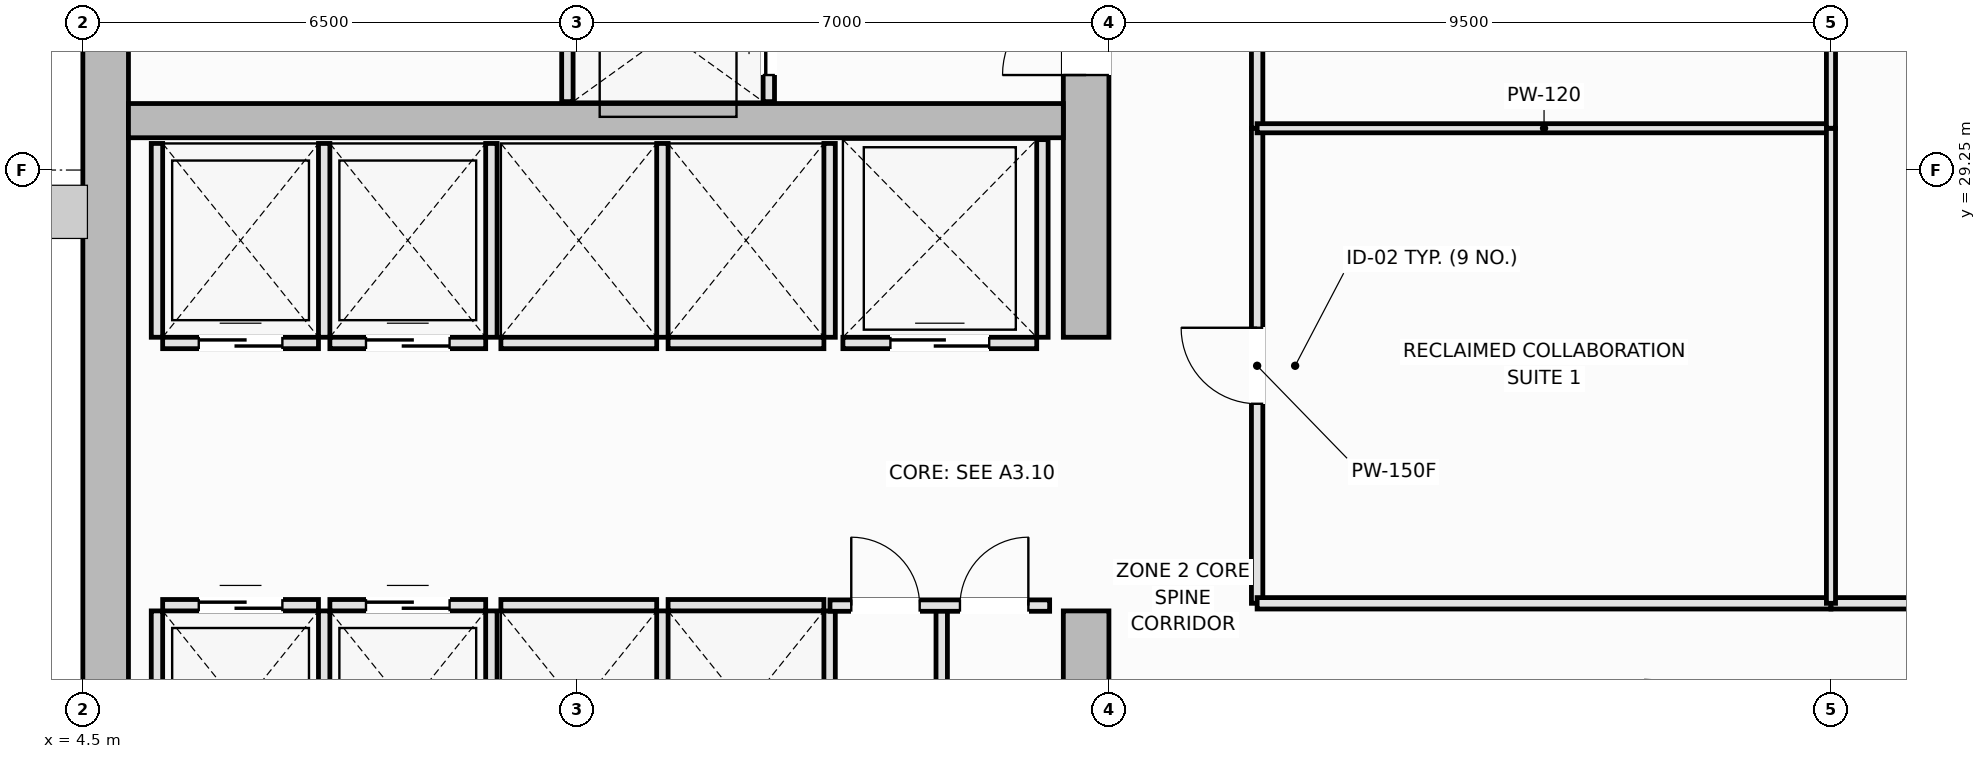
"""IFC4 building model, lengths in metres.
Left out: names, types, materials, properties, quantities, classifications, styles, units other than length and angle.
Written with IfcOpenShell. Run it as: python <this file> out.ifc"""

import sys

from ifc_helpers import new_model, si_unit, direction, frame, frame_2d, origin, place, context, subcontext, project, spatial, rectangle, extrude, element, fill, save


model = new_model("IFC4")
c1 = context("Model", 3, precision=1e-05, world=origin(), true_north=direction((0.0, 1.0)))
c2 = subcontext(c1, "Body", "Model", "MODEL_VIEW")
j1 = project(units=[si_unit("LENGTHUNIT", "METRE"), si_unit("PLANEANGLEUNIT", "RADIAN")], contexts=[c1])
p1 = place(None, origin())
s1 = spatial("IfcSite", under=j1, at=p1, CompositionType="ELEMENT")
p2 = place(p1, origin())
s2 = spatial("IfcBuilding", under=s1, at=p2, CompositionType="ELEMENT")
p3 = place(p2, frame((0.0, 0.0, 134.2)))
s3 = spatial("IfcBuildingStorey", under=s2, at=p3, CompositionType="ELEMENT", Elevation=134.2)
p4 = place(p3, frame((4.8, 14.6, 0.0), z_axis=(0.0, 0.0, 1.0), x_axis=(0.0, 1.0, 0.0)))
e1 = element("IfcWall", 1, at=p4, inside=s3, PredefinedType="SHEAR", context=c2, shape_type="SweptSolid", body=[
    extrude(rectangle(XDim=21.3, YDim=0.6, at=frame_2d((10.65, 0.0))), origin(), (0.0, 0.0, 1.0), 3.55),
])
p5 = place(p3, frame((17.7, 14.6, 0.0), z_axis=(0.0, 0.0, 1.0), x_axis=(0.0, 1.0, 0.0)))
e2 = element("IfcWall", 2, at=p5, inside=s3, PredefinedType="SHEAR", context=c2, shape_type="SweptSolid", body=[
    extrude(rectangle(XDim=8.85, YDim=0.6, at=frame_2d((4.425, 0.0))), origin(), (0.0, 0.0, 1.0), 3.55),
])
p6 = place(p5, frame((4.3, 0.0, 0.0)))
e3 = element("IfcOpeningElement", 3, at=p6, cuts=e2, PredefinedType="OPENING", context=c2, shape_type="SweptSolid", body=[
    extrude(rectangle(XDim=1.1, YDim=2.15, at=frame_2d((0.55, 1.075))), frame((0.0, 0.31, 0.0), z_axis=(0.0, -1.0, 0.0), x_axis=(1.0, 0.0, 0.0)), (0.0, 0.0, 1.0), 0.62),
])
p7 = place(p3, frame((17.7, 27.05, 0.0), z_axis=(0.0, 0.0, 1.0), x_axis=(0.0, 1.0, 0.0)))
e4 = element("IfcWall", 4, at=p7, inside=s3, PredefinedType="SHEAR", context=c2, shape_type="SweptSolid", body=[
    extrude(rectangle(XDim=8.85, YDim=0.6, at=frame_2d((4.425, 0.0))), origin(), (0.0, 0.0, 1.0), 3.55),
])
p8 = place(p7, frame((3.45, 0.0, 0.0)))
e5 = element("IfcOpeningElement", 5, at=p8, cuts=e4, PredefinedType="OPENING", context=c2, shape_type="SweptSolid", body=[
    extrude(rectangle(XDim=1.1, YDim=2.15, at=frame_2d((0.55, 1.075))), frame((0.0, 0.31, 0.0), z_axis=(0.0, -1.0, 0.0), x_axis=(1.0, 0.0, 0.0)), (0.0, 0.0, 1.0), 0.62),
])
p9 = place(p3, frame((5.1, 29.9, 0.0), z_axis=(0.0, 0.0, 1.0), x_axis=(1.0, 0.0, 0.0)))
e6 = element("IfcWall", 6, at=p9, inside=s3, PredefinedType="SHEAR", context=c2, shape_type="SweptSolid", body=[
    extrude(rectangle(XDim=12.3, YDim=0.45, at=frame_2d((6.15, 0.0))), origin(), (0.0, 0.0, 1.0), 3.55),
])
p10 = place(p3, frame((5.55, 23.525, 0.0), z_axis=(0.0, 0.0, 1.0), x_axis=(1.0, 0.0, 0.0)))
e7 = element("IfcWall", 7, at=p10, inside=s3, PredefinedType="PARTITIONING", context=c2, shape_type="SweptSolid", body=[
    extrude(rectangle(XDim=2.05, YDim=0.15, at=frame_2d((1.025, 0.0))), origin(), (0.0, 0.0, 1.0), 3.37),
])
p11 = place(p10, frame((0.475, 0.0, 0.0)))
e8 = element("IfcOpeningElement", 8, at=p11, cuts=e7, PredefinedType="OPENING", context=c2, shape_type="SweptSolid", body=[
    extrude(rectangle(XDim=1.1, YDim=2.2, at=frame_2d((0.55, 1.1))), frame((0.0, 0.085, 0.0), z_axis=(0.0, -1.0, 0.0), x_axis=(1.0, 0.0, 0.0)), (0.0, 0.0, 1.0), 0.17),
])
for number, where, z_axis, x_axis in (
    (9, (5.475, 20.9, 0.0), (0.0, 0.0, 1.0), (0.0, 1.0, 0.0)),
    (10, (7.675, 20.9, 0.0), (0.0, 0.0, 1.0), (0.0, 1.0, 0.0)),
):
    element("IfcWall", number, at=place(p3, frame(where, z_axis=z_axis, x_axis=x_axis)), inside=s3, PredefinedType="PARTITIONING", context=c2, shape_type="SweptSolid", body=[
        extrude(rectangle(XDim=2.55, YDim=0.15, at=frame_2d((1.275, 0.0))), origin(), (0.0, 0.0, 1.0), 3.37),
    ])
p12 = place(p3, frame((7.75, 23.525, 0.0), z_axis=(0.0, 0.0, 1.0), x_axis=(1.0, 0.0, 0.0)))
e11 = element("IfcWall", 11, at=p12, inside=s3, PredefinedType="PARTITIONING", context=c2, shape_type="SweptSolid", body=[
    extrude(rectangle(XDim=2.05, YDim=0.15, at=frame_2d((1.025, 0.0))), origin(), (0.0, 0.0, 1.0), 3.37),
])
p13 = place(p12, frame((0.475, 0.0, 0.0)))
e12 = element("IfcOpeningElement", 12, at=p13, cuts=e11, PredefinedType="OPENING", context=c2, shape_type="SweptSolid", body=[
    extrude(rectangle(XDim=1.1, YDim=2.2, at=frame_2d((0.55, 1.1))), frame((0.0, 0.085, 0.0), z_axis=(0.0, -1.0, 0.0), x_axis=(1.0, 0.0, 0.0)), (0.0, 0.0, 1.0), 0.17),
])
p14 = place(p3, frame((9.875, 20.9, 0.0), z_axis=(0.0, 0.0, 1.0), x_axis=(0.0, 1.0, 0.0)))
e13 = element("IfcWall", 13, at=p14, inside=s3, PredefinedType="PARTITIONING", context=c2, shape_type="SweptSolid", body=[
    extrude(rectangle(XDim=2.55, YDim=0.15, at=frame_2d((1.275, 0.0))), origin(), (0.0, 0.0, 1.0), 3.37),
])
p15 = place(p3, frame((5.55, 26.975, 0.0), z_axis=(0.0, 0.0, 1.0), x_axis=(1.0, 0.0, 0.0)))
e14 = element("IfcWall", 14, at=p15, inside=s3, PredefinedType="PARTITIONING", context=c2, shape_type="SweptSolid", body=[
    extrude(rectangle(XDim=2.05, YDim=0.15, at=frame_2d((1.025, 0.0))), origin(), (0.0, 0.0, 1.0), 3.37),
])
p16 = place(p15, frame((0.475, 0.0, 0.0)))
e15 = element("IfcOpeningElement", 15, at=p16, cuts=e14, PredefinedType="OPENING", context=c2, shape_type="SweptSolid", body=[
    extrude(rectangle(XDim=1.1, YDim=2.2, at=frame_2d((0.55, 1.1))), frame((0.0, 0.085, 0.0), z_axis=(0.0, -1.0, 0.0), x_axis=(1.0, 0.0, 0.0)), (0.0, 0.0, 1.0), 0.17),
])
for number, where, z_axis, x_axis in (
    (16, (5.475, 27.05, 0.0), (0.0, 0.0, 1.0), (0.0, 1.0, 0.0)),
    (17, (7.675, 27.05, 0.0), (0.0, 0.0, 1.0), (0.0, 1.0, 0.0)),
):
    element("IfcWall", number, at=place(p3, frame(where, z_axis=z_axis, x_axis=x_axis)), inside=s3, PredefinedType="PARTITIONING", context=c2, shape_type="SweptSolid", body=[
        extrude(rectangle(XDim=2.55, YDim=0.15, at=frame_2d((1.275, 0.0))), origin(), (0.0, 0.0, 1.0), 3.37),
    ])
p17 = place(p3, frame((7.75, 26.975, 0.0), z_axis=(0.0, 0.0, 1.0), x_axis=(1.0, 0.0, 0.0)))
e18 = element("IfcWall", 18, at=p17, inside=s3, PredefinedType="PARTITIONING", context=c2, shape_type="SweptSolid", body=[
    extrude(rectangle(XDim=2.05, YDim=0.15, at=frame_2d((1.025, 0.0))), origin(), (0.0, 0.0, 1.0), 3.37),
])
p18 = place(p17, frame((0.475, 0.0, 0.0)))
e19 = element("IfcOpeningElement", 19, at=p18, cuts=e18, PredefinedType="OPENING", context=c2, shape_type="SweptSolid", body=[
    extrude(rectangle(XDim=1.1, YDim=2.2, at=frame_2d((0.55, 1.1))), frame((0.0, 0.085, 0.0), z_axis=(0.0, -1.0, 0.0), x_axis=(1.0, 0.0, 0.0)), (0.0, 0.0, 1.0), 0.17),
])
p19 = place(p3, frame((9.875, 27.05, 0.0), z_axis=(0.0, 0.0, 1.0), x_axis=(0.0, 1.0, 0.0)))
e20 = element("IfcWall", 20, at=p19, inside=s3, PredefinedType="PARTITIONING", context=c2, shape_type="SweptSolid", body=[
    extrude(rectangle(XDim=2.55, YDim=0.15, at=frame_2d((1.275, 0.0))), origin(), (0.0, 0.0, 1.0), 3.37),
])
p20 = place(p3, frame((10.0, 23.525, 0.0), z_axis=(0.0, 0.0, 1.0), x_axis=(1.0, 0.0, 0.0)))
e21 = element("IfcWall", 21, at=p20, inside=s3, PredefinedType="PARTITIONING", context=c2, shape_type="SweptSolid", body=[
    extrude(rectangle(XDim=2.05, YDim=0.15, at=frame_2d((1.025, 0.0))), origin(), (0.0, 0.0, 1.0), 3.37),
])
p21 = place(p3, frame((12.125, 20.9, 0.0), z_axis=(0.0, 0.0, 1.0), x_axis=(0.0, 1.0, 0.0)))
e22 = element("IfcWall", 22, at=p21, inside=s3, PredefinedType="PARTITIONING", context=c2, shape_type="SweptSolid", body=[
    extrude(rectangle(XDim=2.55, YDim=0.15, at=frame_2d((1.275, 0.0))), origin(), (0.0, 0.0, 1.0), 3.37),
])
p22 = place(p3, frame((12.2, 23.525, 0.0), z_axis=(0.0, 0.0, 1.0), x_axis=(1.0, 0.0, 0.0)))
e23 = element("IfcWall", 23, at=p22, inside=s3, PredefinedType="PARTITIONING", context=c2, shape_type="SweptSolid", body=[
    extrude(rectangle(XDim=2.05, YDim=0.15, at=frame_2d((1.025, 0.0))), origin(), (0.0, 0.0, 1.0), 3.37),
])
p23 = place(p3, frame((14.325, 20.9, 0.0), z_axis=(0.0, 0.0, 1.0), x_axis=(0.0, 1.0, 0.0)))
e24 = element("IfcWall", 24, at=p23, inside=s3, PredefinedType="PARTITIONING", context=c2, shape_type="SweptSolid", body=[
    extrude(rectangle(XDim=2.55, YDim=0.15, at=frame_2d((1.275, 0.0))), origin(), (0.0, 0.0, 1.0), 3.37),
])
p24 = place(p3, frame((10.0, 26.975, 0.0), z_axis=(0.0, 0.0, 1.0), x_axis=(1.0, 0.0, 0.0)))
e25 = element("IfcWall", 25, at=p24, inside=s3, PredefinedType="PARTITIONING", context=c2, shape_type="SweptSolid", body=[
    extrude(rectangle(XDim=2.05, YDim=0.15, at=frame_2d((1.025, 0.0))), origin(), (0.0, 0.0, 1.0), 3.37),
])
p25 = place(p3, frame((12.125, 27.05, 0.0), z_axis=(0.0, 0.0, 1.0), x_axis=(0.0, 1.0, 0.0)))
e26 = element("IfcWall", 26, at=p25, inside=s3, PredefinedType="PARTITIONING", context=c2, shape_type="SweptSolid", body=[
    extrude(rectangle(XDim=2.55, YDim=0.15, at=frame_2d((1.275, 0.0))), origin(), (0.0, 0.0, 1.0), 3.37),
])
p26 = place(p3, frame((12.2, 26.975, 0.0), z_axis=(0.0, 0.0, 1.0), x_axis=(1.0, 0.0, 0.0)))
e27 = element("IfcWall", 27, at=p26, inside=s3, PredefinedType="PARTITIONING", context=c2, shape_type="SweptSolid", body=[
    extrude(rectangle(XDim=2.05, YDim=0.15, at=frame_2d((1.025, 0.0))), origin(), (0.0, 0.0, 1.0), 3.37),
])
p27 = place(p3, frame((14.325, 27.05, 0.0), z_axis=(0.0, 0.0, 1.0), x_axis=(0.0, 1.0, 0.0)))
e28 = element("IfcWall", 28, at=p27, inside=s3, PredefinedType="PARTITIONING", context=c2, shape_type="SweptSolid", body=[
    extrude(rectangle(XDim=2.55, YDim=0.15, at=frame_2d((1.275, 0.0))), origin(), (0.0, 0.0, 1.0), 3.37),
])
p28 = place(p3, frame((14.5, 26.975, 0.0), z_axis=(0.0, 0.0, 1.0), x_axis=(1.0, 0.0, 0.0)))
e29 = element("IfcWall", 29, at=p28, inside=s3, PredefinedType="PARTITIONING", context=c2, shape_type="SweptSolid", body=[
    extrude(rectangle(XDim=2.55, YDim=0.15, at=frame_2d((1.275, 0.0))), origin(), (0.0, 0.0, 1.0), 3.37),
])
p29 = place(p28, frame((0.625, 0.0, 0.0)))
e30 = element("IfcOpeningElement", 30, at=p29, cuts=e29, PredefinedType="OPENING", context=c2, shape_type="SweptSolid", body=[
    extrude(rectangle(XDim=1.3, YDim=2.2, at=frame_2d((0.65, 1.1))), frame((0.0, 0.085, 0.0), z_axis=(0.0, -1.0, 0.0), x_axis=(1.0, 0.0, 0.0)), (0.0, 0.0, 1.0), 0.17),
])
p30 = place(p3, frame((17.125, 27.05, 0.0), z_axis=(0.0, 0.0, 1.0), x_axis=(0.0, 1.0, 0.0)))
e31 = element("IfcWall", 31, at=p30, inside=s3, PredefinedType="PARTITIONING", context=c2, shape_type="SweptSolid", body=[
    extrude(rectangle(XDim=2.6, YDim=0.15, at=frame_2d((1.3, 0.0))), origin(), (0.0, 0.0, 1.0), 3.37),
])
p31 = place(p3, frame((10.875, 30.15, 0.0), z_axis=(0.0, 0.0, 1.0), x_axis=(0.0, 1.0, 0.0)))
e32 = element("IfcWall", 32, at=p31, inside=s3, PredefinedType="PARTITIONING", context=c2, shape_type="SweptSolid", body=[
    extrude(rectangle(XDim=1.8, YDim=0.15, at=frame_2d((0.9, 0.0))), origin(), (0.0, 0.0, 1.0), 3.37),
])
p32 = place(p3, frame((13.525, 30.15, 0.0), z_axis=(0.0, 0.0, 1.0), x_axis=(0.0, 1.0, 0.0)))
e33 = element("IfcWall", 33, at=p32, inside=s3, PredefinedType="PARTITIONING", context=c2, shape_type="SweptSolid", body=[
    extrude(rectangle(XDim=1.8, YDim=0.15, at=frame_2d((0.9, 0.0))), origin(), (0.0, 0.0, 1.0), 3.37),
])
p33 = place(p32, frame((0.35, 0.0, 0.0)))
e34 = element("IfcOpeningElement", 34, at=p33, cuts=e33, PredefinedType="OPENING", context=c2, shape_type="SweptSolid", body=[
    extrude(rectangle(XDim=1.1, YDim=2.2, at=frame_2d((0.55, 1.1))), frame((0.0, 0.085, 0.0), z_axis=(0.0, -1.0, 0.0), x_axis=(1.0, 0.0, 0.0)), (0.0, 0.0, 1.0), 0.17),
])
p34 = place(p3, frame((15.8, 20.85, 0.0), z_axis=(0.0, 0.0, 1.0), x_axis=(0.0, 1.0, 0.0)))
e35 = element("IfcWall", 35, at=p34, inside=s3, PredefinedType="PARTITIONING", context=c2, shape_type="SweptSolid", body=[
    extrude(rectangle(XDim=2.67, YDim=0.15, at=frame_2d((1.335, 0.0))), origin(), (0.0, 0.0, 1.0), 3.37),
])
p35 = place(p3, frame((14.33, 23.52, 0.0), z_axis=(0.0, 0.0, 1.0), x_axis=(1.0, 0.0, 0.0)))
e36 = element("IfcWall", 36, at=p35, inside=s3, PredefinedType="PARTITIONING", context=c2, shape_type="SweptSolid", body=[
    extrude(rectangle(XDim=2.89, YDim=0.15, at=frame_2d((1.445, 0.0))), origin(), (0.0, 0.0, 1.0), 3.37),
])
p36 = place(p35, frame((0.28, 0.0, 0.0)))
e37 = element("IfcOpeningElement", 37, at=p36, cuts=e36, PredefinedType="OPENING", context=c2, shape_type="SweptSolid", body=[
    extrude(rectangle(XDim=0.9, YDim=2.1, at=frame_2d((0.45, 1.05))), frame((0.0, 0.085, 0.0), z_axis=(0.0, -1.0, 0.0), x_axis=(1.0, 0.0, 0.0)), (0.0, 0.0, 1.0), 0.17),
])
p37 = place(p35, frame((1.71, 0.0, 0.0)))
e38 = element("IfcOpeningElement", 38, at=p37, cuts=e36, PredefinedType="OPENING", context=c2, shape_type="SweptSolid", body=[
    extrude(rectangle(XDim=0.9, YDim=2.1, at=frame_2d((0.45, 1.05))), frame((0.0, 0.085, 0.0), z_axis=(0.0, -1.0, 0.0), x_axis=(1.0, 0.0, 0.0)), (0.0, 0.0, 1.0), 0.17),
])
p38 = place(p3, frame((19.95, 23.55, 0.0), z_axis=(0.0, 0.0, 1.0), x_axis=(0.0, 1.0, 0.0)))
e39 = element("IfcWall", 39, at=p38, inside=s3, PredefinedType="PARTITIONING", context=c2, shape_type="SweptSolid", body=[
    extrude(rectangle(XDim=6.25, YDim=0.15, at=frame_2d((3.125, 0.0))), origin(), (0.0, 0.0, 1.0), 3.37),
])
p39 = place(p38, frame((2.625, 0.0, 0.0)))
e40 = element("IfcOpeningElement", 40, at=p39, cuts=e39, PredefinedType="OPENING", context=c2, shape_type="SweptSolid", body=[
    extrude(rectangle(XDim=1.0, YDim=2.15, at=frame_2d((0.5, 1.075))), frame((0.0, 0.085, 0.0), z_axis=(0.0, -1.0, 0.0), x_axis=(1.0, 0.0, 0.0)), (0.0, 0.0, 1.0), 0.17),
])
p40 = place(p3, frame((19.95, 29.8, 0.0), z_axis=(0.0, 0.0, 1.0), x_axis=(0.0, 1.0, 0.0)))
e41 = element("IfcWall", 41, at=p40, inside=s3, PredefinedType="PARTITIONING", context=c2, shape_type="SweptSolid", body=[
    extrude(rectangle(XDim=3.4, YDim=0.15, at=frame_2d((1.7, 0.0))), origin(), (0.0, 0.0, 1.0), 3.37),
])
p41 = place(p40, frame((1.2, 0.0, 0.0)))
e42 = element("IfcOpeningElement", 42, at=p41, cuts=e41, PredefinedType="OPENING", context=c2, shape_type="SweptSolid", body=[
    extrude(rectangle(XDim=1.0, YDim=2.15, at=frame_2d((0.5, 1.075))), frame((0.0, 0.085, 0.0), z_axis=(0.0, -1.0, 0.0), x_axis=(1.0, 0.0, 0.0)), (0.0, 0.0, 1.0), 0.17),
])
p42 = place(p3, frame((19.95, 23.55, 0.0), z_axis=(0.0, 0.0, 1.0), x_axis=(1.0, 0.0, 0.0)))
e43 = element("IfcWall", 43, at=p42, inside=s3, PredefinedType="PARTITIONING", context=c2, shape_type="SweptSolid", body=[
    extrude(rectangle(XDim=7.55, YDim=0.15, at=frame_2d((3.775, 0.0))), origin(), (0.0, 0.0, 1.0), 3.37),
])
p43 = place(p3, frame((27.5, 23.55, 0.0), z_axis=(0.0, 0.0, 1.0), x_axis=(1.0, 0.0, 0.0)))
e44 = element("IfcWall", 44, at=p43, inside=s3, PredefinedType="PARTITIONING", context=c2, shape_type="SweptSolid", body=[
    extrude(rectangle(XDim=4.3, YDim=0.15, at=frame_2d((2.15, 0.0))), origin(), (0.0, 0.0, 1.0), 3.37),
])
p44 = place(p43, frame((1.65, 0.0, 0.0)))
e45 = element("IfcOpeningElement", 45, at=p44, cuts=e44, PredefinedType="OPENING", context=c2, shape_type="SweptSolid", body=[
    extrude(rectangle(XDim=1.0, YDim=2.15, at=frame_2d((0.5, 1.075))), frame((0.0, 0.085, 0.0), z_axis=(0.0, -1.0, 0.0), x_axis=(1.0, 0.0, 0.0)), (0.0, 0.0, 1.0), 0.17),
])
p45 = place(p3, frame((19.95, 29.8, 0.0), z_axis=(0.0, 0.0, 1.0), x_axis=(1.0, 0.0, 0.0)))
e46 = element("IfcWall", 46, at=p45, inside=s3, PredefinedType="PARTITIONING", context=c2, shape_type="SweptSolid", body=[
    extrude(rectangle(XDim=7.55, YDim=0.12, at=frame_2d((3.775, 0.0))), origin(), (0.0, 0.0, 1.0), 3.37),
])
p46 = place(p3, frame((27.5, 23.55, 0.0), z_axis=(0.0, 0.0, 1.0), x_axis=(0.0, 1.0, 0.0)))
e47 = element("IfcWall", 47, at=p46, inside=s3, PredefinedType="PARTITIONING", context=c2, shape_type="SweptSolid", body=[
    extrude(rectangle(XDim=6.25, YDim=0.12, at=frame_2d((3.125, 0.0))), origin(), (0.0, 0.0, 1.0), 3.37),
])
p47 = place(p3, frame((27.5, 29.8, 0.0), z_axis=(0.0, 0.0, 1.0), x_axis=(0.0, 1.0, 0.0)))
e48 = element("IfcWall", 48, at=p47, inside=s3, PredefinedType="PARTITIONING", context=c2, shape_type="SweptSolid", body=[
    extrude(rectangle(XDim=3.4, YDim=0.12, at=frame_2d((1.7, 0.0))), origin(), (0.0, 0.0, 1.0), 3.37),
])
p48 = place(p11, origin())
e49 = element("IfcDoor", 49, at=p48, inside=s3, OperationType="DOUBLE_DOOR_SLIDING", PredefinedType="DOOR", context=c2, shape_type="SweptSolid", body=[
    extrude(rectangle(XDim=1.1, YDim=2.2, at=frame_2d((0.55, 1.1))), frame((0.0, 0.025, 0.0), z_axis=(0.0, -1.0, 0.0), x_axis=(1.0, 0.0, 0.0)), (0.0, 0.0, 1.0), 0.05),
])
fill(e8, e49)
p49 = place(p13, origin())
e50 = element("IfcDoor", 50, at=p49, inside=s3, OperationType="DOUBLE_DOOR_SLIDING", PredefinedType="DOOR", context=c2, shape_type="SweptSolid", body=[
    extrude(rectangle(XDim=1.1, YDim=2.2, at=frame_2d((0.55, 1.1))), frame((0.0, 0.025, 0.0), z_axis=(0.0, -1.0, 0.0), x_axis=(1.0, 0.0, 0.0)), (0.0, 0.0, 1.0), 0.05),
])
fill(e12, e50)
p50 = place(p16, origin())
e51 = element("IfcDoor", 51, at=p50, inside=s3, OperationType="DOUBLE_DOOR_SLIDING", PredefinedType="DOOR", context=c2, shape_type="SweptSolid", body=[
    extrude(rectangle(XDim=1.1, YDim=2.2, at=frame_2d((0.55, 1.1))), frame((0.0, 0.025, 0.0), z_axis=(0.0, -1.0, 0.0), x_axis=(1.0, 0.0, 0.0)), (0.0, 0.0, 1.0), 0.05),
])
fill(e15, e51)
p51 = place(p18, origin())
e52 = element("IfcDoor", 52, at=p51, inside=s3, OperationType="DOUBLE_DOOR_SLIDING", PredefinedType="DOOR", context=c2, shape_type="SweptSolid", body=[
    extrude(rectangle(XDim=1.1, YDim=2.2, at=frame_2d((0.55, 1.1))), frame((0.0, 0.025, 0.0), z_axis=(0.0, -1.0, 0.0), x_axis=(1.0, 0.0, 0.0)), (0.0, 0.0, 1.0), 0.05),
])
fill(e19, e52)
p52 = place(p29, origin())
e53 = element("IfcDoor", 53, at=p52, inside=s3, OperationType="DOUBLE_DOOR_SLIDING", PredefinedType="DOOR", context=c2, shape_type="SweptSolid", body=[
    extrude(rectangle(XDim=1.3, YDim=2.2, at=frame_2d((0.65, 1.1))), frame((0.0, 0.025, 0.0), z_axis=(0.0, -1.0, 0.0), x_axis=(1.0, 0.0, 0.0)), (0.0, 0.0, 1.0), 0.05),
])
fill(e30, e53)
p53 = place(p33, origin())
e54 = element("IfcDoor", 54, at=p53, inside=s3, OperationType="DOUBLE_DOOR_SLIDING", PredefinedType="DOOR", context=c2, shape_type="SweptSolid", body=[
    extrude(rectangle(XDim=1.1, YDim=2.2, at=frame_2d((0.55, 1.1))), frame((0.0, 0.025, 0.0), z_axis=(0.0, -1.0, 0.0), x_axis=(1.0, 0.0, 0.0)), (0.0, 0.0, 1.0), 0.05),
])
fill(e34, e54)
p54 = place(p8, origin())
e55 = element("IfcDoor", 55, at=p54, inside=s3, OperationType="SINGLE_SWING_LEFT", PredefinedType="DOOR", context=c2, shape_type="SweptSolid", body=[
    extrude(rectangle(XDim=1.1, YDim=2.15, at=frame_2d((0.55, 1.075))), frame((0.0, 0.025, 0.0), z_axis=(0.0, -1.0, 0.0), x_axis=(1.0, 0.0, 0.0)), (0.0, 0.0, 1.0), 0.05),
])
fill(e5, e55)
p55 = place(p36, origin())
e56 = element("IfcDoor", 56, at=p55, inside=s3, OperationType="SINGLE_SWING_LEFT", PredefinedType="DOOR", context=c2, shape_type="SweptSolid", body=[
    extrude(rectangle(XDim=0.9, YDim=2.1, at=frame_2d((0.45, 1.05))), frame((0.0, 0.025, 0.0), z_axis=(0.0, -1.0, 0.0), x_axis=(1.0, 0.0, 0.0)), (0.0, 0.0, 1.0), 0.05),
])
fill(e37, e56)
p56 = place(p37, origin())
e57 = element("IfcDoor", 57, at=p56, inside=s3, OperationType="SINGLE_SWING_RIGHT", PredefinedType="DOOR", context=c2, shape_type="SweptSolid", body=[
    extrude(rectangle(XDim=0.9, YDim=2.1, at=frame_2d((0.45, 1.05))), frame((0.0, 0.025, 0.0), z_axis=(0.0, -1.0, 0.0), x_axis=(1.0, 0.0, 0.0)), (0.0, 0.0, 1.0), 0.05),
])
fill(e38, e57)
p57 = place(p39, origin())
e58 = element("IfcDoor", 58, at=p57, inside=s3, OperationType="SINGLE_SWING_RIGHT", PredefinedType="DOOR", context=c2, shape_type="SweptSolid", body=[
    extrude(rectangle(XDim=1.0, YDim=2.15, at=frame_2d((0.5, 1.075))), frame((0.0, 0.025, 0.0), z_axis=(0.0, -1.0, 0.0), x_axis=(1.0, 0.0, 0.0)), (0.0, 0.0, 1.0), 0.05),
])
fill(e40, e58)
save(model, sys.argv[1])
